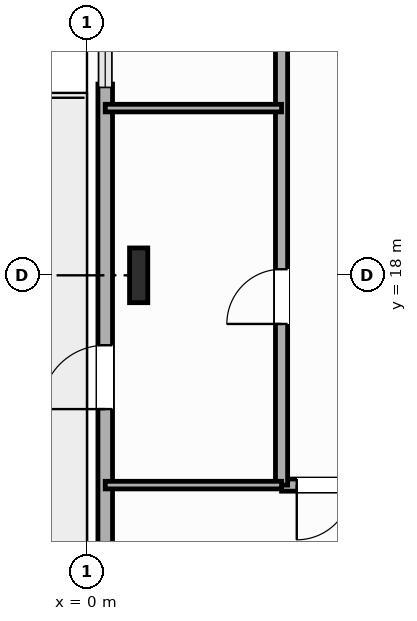
"""IFC4 building model, lengths in metres.
Left out: names, types, materials, properties, quantities, classifications, styles, units other than length and angle.
Written with IfcOpenShell. Run it as: python <this file> out.ifc"""

import sys

from ifc_helpers import new_model, si_unit, direction, frame, frame_2d, origin, origin_2d, place, context, subcontext, project, spatial, rectangle, i_section, extrude, element, fill, save


model = new_model("IFC4")
c1 = context("Model", 3, precision=1e-05, world=origin(), true_north=direction((0.0, 1.0)))
c2 = subcontext(c1, "Body", "Model", "MODEL_VIEW")
j1 = project(units=[si_unit("LENGTHUNIT", "METRE"), si_unit("PLANEANGLEUNIT", "RADIAN")], contexts=[c1])
p1 = place(None, origin())
s1 = spatial("IfcSite", under=j1, at=p1, CompositionType="ELEMENT")
p2 = place(p1, origin())
s2 = spatial("IfcBuilding", under=s1, at=p2, CompositionType="ELEMENT")
p3 = place(p2, frame((0.0, 0.0, 48.0)))
s3 = spatial("IfcBuildingStorey", under=s2, at=p3, CompositionType="ELEMENT", Elevation=48.0)
p4 = place(p3, frame((0.85, 18.0, 0.0), z_axis=(0.0, 0.0, 1.0), x_axis=(1.0, 0.0, 0.0)))
e1 = element("IfcColumn", 1, at=p4, inside=s3, PredefinedType="COLUMN", context=c2, shape_type="SweptSolid", body=[
    extrude(i_section(OverallWidth=0.3, OverallDepth=0.9, WebThickness=0.019, FlangeThickness=0.035, FilletRadius=0.03, at=origin_2d()), origin(), (0.0, 0.0, 1.0), 3.9),
])
p5 = place(p3, frame((0.3, 11.855, 0.0), z_axis=(0.0, 0.0, 1.0), x_axis=(0.0, 1.0, 0.0)))
e2 = element("IfcWall", 2, at=p5, inside=s3, PredefinedType="SOLIDWALL", context=c2, shape_type="SweptSolid", body=[
    extrude(rectangle(XDim=9.29, YDim=0.24, at=frame_2d((4.645, 0.0))), origin(), (0.0, 0.0, 1.0), 3.65),
])
p6 = place(p5, frame((3.945, 0.0, 0.0)))
e3 = element("IfcOpeningElement", 3, at=p6, cuts=e2, PredefinedType="OPENING", context=c2, shape_type="SweptSolid", body=[
    extrude(rectangle(XDim=1.05, YDim=2.2, at=frame_2d((0.525, 1.1))), frame((0.0, 0.13, 0.0), z_axis=(0.0, -1.0, 0.0), x_axis=(1.0, 0.0, 0.0)), (0.0, 0.0, 1.0), 0.26),
])
p7 = place(p3, frame((5.15, 14.55, 0.0), z_axis=(0.0, 0.0, 1.0), x_axis=(-1.0, 0.0, 0.0)))
e4 = element("IfcWall", 4, at=p7, inside=s3, PredefinedType="PARTITIONING", context=c2, shape_type="SweptSolid", body=[
    extrude(rectangle(XDim=1.95, YDim=0.2, at=frame_2d((0.975, 0.0))), origin(), (0.0, 0.0, 1.0), 3.65),
])
p8 = place(p7, frame((0.8, 0.0, 0.0)))
e5 = element("IfcOpeningElement", 5, at=p8, cuts=e4, PredefinedType="OPENING", context=c2, shape_type="SweptSolid", body=[
    extrude(rectangle(XDim=0.9, YDim=2.1, at=frame_2d((0.45, 1.05))), frame((0.0, 0.11, 0.0), z_axis=(0.0, -1.0, 0.0), x_axis=(1.0, 0.0, 0.0)), (0.0, 0.0, 1.0), 0.22),
])
p9 = place(p3, frame((3.2, 14.55, 0.0), z_axis=(0.0, 0.0, 1.0), x_axis=(0.0, 1.0, 0.0)))
e6 = element("IfcWall", 6, at=p9, inside=s3, PredefinedType="PARTITIONING", context=c2, shape_type="SweptSolid", body=[
    extrude(rectangle(XDim=15.7, YDim=0.2, at=frame_2d((7.85, 0.0))), origin(), (0.0, 0.0, 1.0), 3.65),
])
p10 = place(p9, frame((2.65, 0.0, 0.0)))
e7 = element("IfcOpeningElement", 7, at=p10, cuts=e6, PredefinedType="OPENING", context=c2, shape_type="SweptSolid", body=[
    extrude(rectangle(XDim=0.9, YDim=2.1, at=frame_2d((0.45, 1.05))), frame((0.0, 0.11, 0.0), z_axis=(0.0, -1.0, 0.0), x_axis=(1.0, 0.0, 0.0)), (0.0, 0.0, 1.0), 0.22),
])
p11 = place(p9, frame((8.85, 0.0, 0.0)))
e8 = element("IfcOpeningElement", 8, at=p11, cuts=e6, PredefinedType="OPENING", context=c2, shape_type="SweptSolid", body=[
    extrude(rectangle(XDim=0.9, YDim=2.1, at=frame_2d((0.45, 1.05))), frame((0.0, 0.11, 0.0), z_axis=(0.0, -1.0, 0.0), x_axis=(1.0, 0.0, 0.0)), (0.0, 0.0, 1.0), 0.22),
])
p12 = place(p9, frame((13.6, 0.0, 0.0)))
e9 = element("IfcOpeningElement", 9, at=p12, cuts=e6, PredefinedType="OPENING", context=c2, shape_type="SweptSolid", body=[
    extrude(rectangle(XDim=0.9, YDim=2.1, at=frame_2d((0.45, 1.05))), frame((0.0, 0.11, 0.0), z_axis=(0.0, -1.0, 0.0), x_axis=(1.0, 0.0, 0.0)), (0.0, 0.0, 1.0), 0.22),
])
for number, where, z_axis, x_axis in (
    (10, (0.3, 14.55, 0.0), (0.0, 0.0, 1.0), (1.0, 0.0, 0.0)),
    (11, (0.3, 20.75, 0.0), (0.0, 0.0, 1.0), (1.0, 0.0, 0.0)),
):
    element("IfcWall", number, at=place(p3, frame(where, z_axis=z_axis, x_axis=x_axis)), inside=s3, PredefinedType="PARTITIONING", context=c2, shape_type="SweptSolid", body=[
        extrude(rectangle(XDim=2.9, YDim=0.125, at=frame_2d((1.45, 0.0))), origin(), (0.0, 0.0, 1.0), 3.65),
    ])
p13 = place(p6, origin())
e12 = element("IfcDoor", 12, at=p13, inside=s3, OperationType="SINGLE_SWING_LEFT", PredefinedType="DOOR", context=c2, shape_type="SweptSolid", body=[
    extrude(rectangle(XDim=1.05, YDim=2.2, at=frame_2d((0.525, 1.1))), frame((0.0, 0.025, 0.0), z_axis=(0.0, -1.0, 0.0), x_axis=(1.0, 0.0, 0.0)), (0.0, 0.0, 1.0), 0.05),
])
fill(e3, e12)
p14 = place(p8, origin())
e13 = element("IfcDoor", 13, at=p14, inside=s3, OperationType="SINGLE_SWING_RIGHT", PredefinedType="DOOR", context=c2, shape_type="SweptSolid", body=[
    extrude(rectangle(XDim=0.9, YDim=2.1, at=frame_2d((0.45, 1.05))), frame((0.0, 0.025, 0.0), z_axis=(0.0, -1.0, 0.0), x_axis=(1.0, 0.0, 0.0)), (0.0, 0.0, 1.0), 0.05),
])
fill(e5, e13)
p15 = place(p10, origin())
e14 = element("IfcDoor", 14, at=p15, inside=s3, OperationType="SINGLE_SWING_LEFT", PredefinedType="DOOR", context=c2, shape_type="SweptSolid", body=[
    extrude(rectangle(XDim=0.9, YDim=2.1, at=frame_2d((0.45, 1.05))), frame((0.0, 0.025, 0.0), z_axis=(0.0, -1.0, 0.0), x_axis=(1.0, 0.0, 0.0)), (0.0, 0.0, 1.0), 0.05),
])
fill(e7, e14)
save(model, sys.argv[1])
